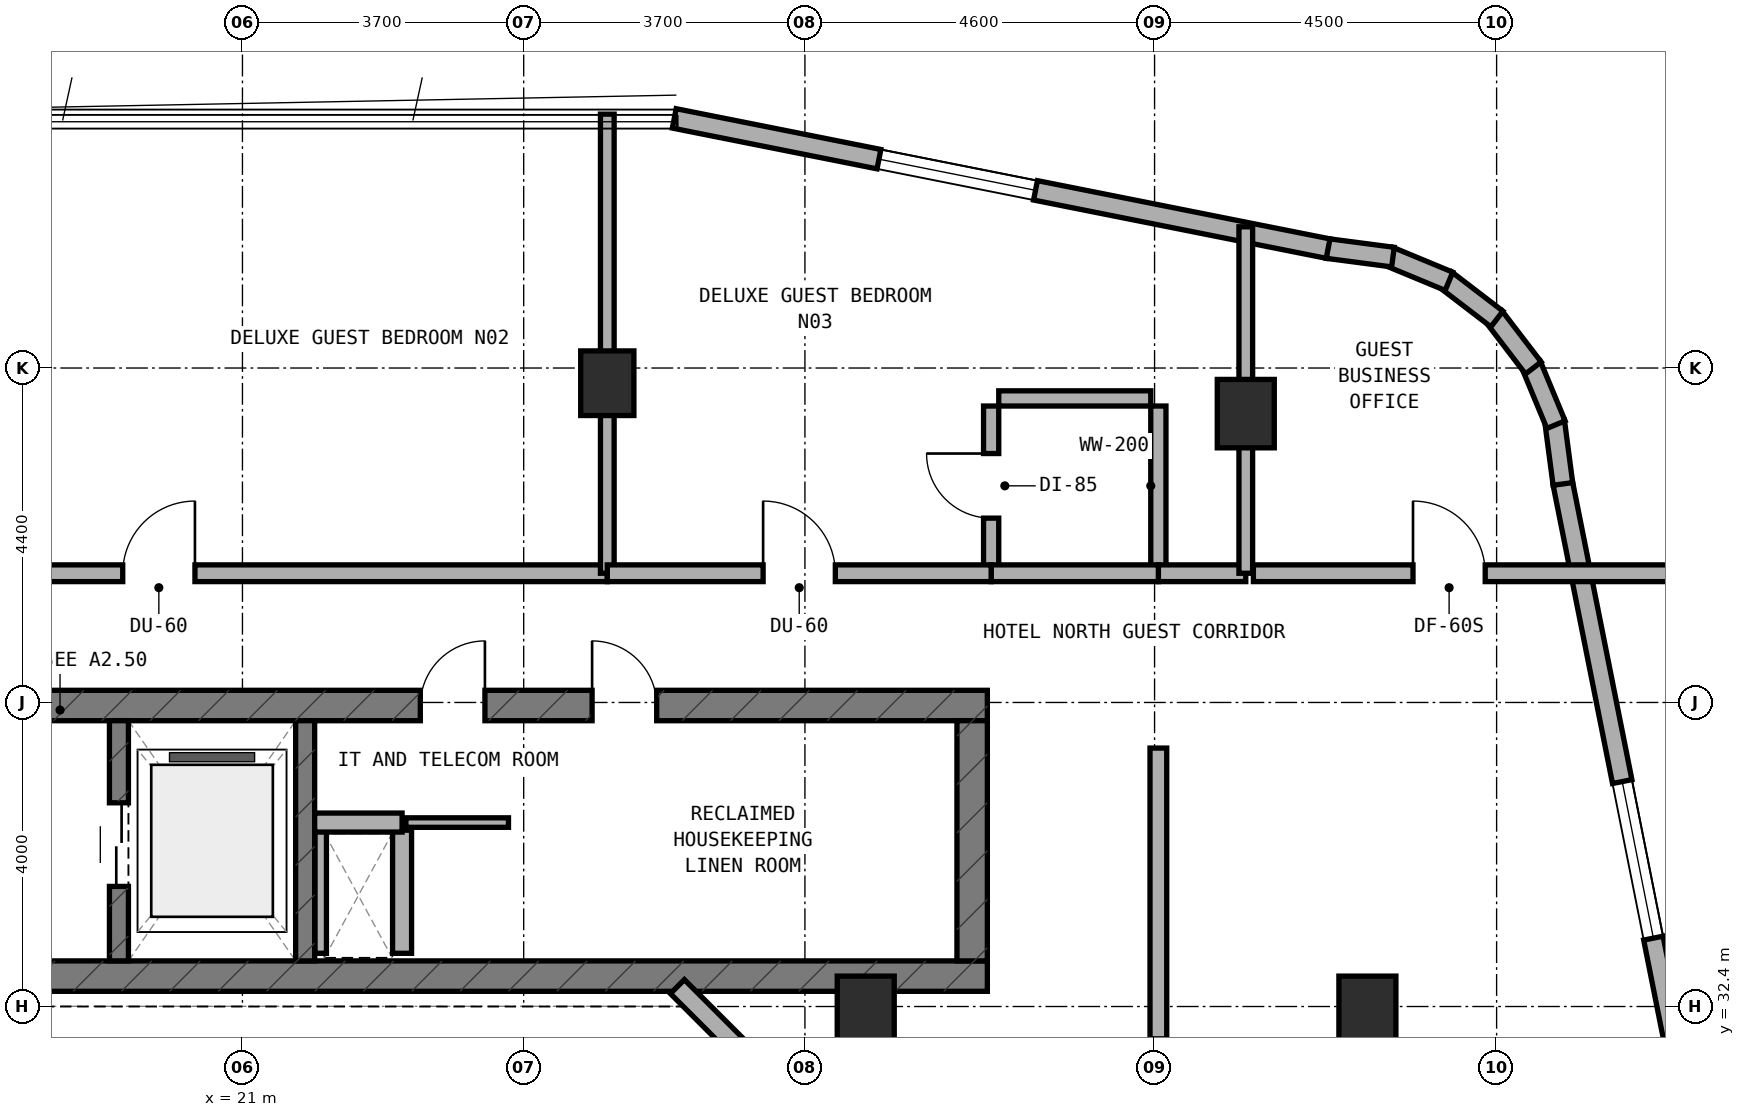
"""IFC4 building model, lengths in metres.
Left out: names, types, materials, properties, quantities, classifications, styles, units other than length and angle.
Written with IfcOpenShell. Run it as: python <this file> out.ifc"""

import sys

from ifc_helpers import new_model, si_unit, direction, frame, frame_2d, origin, origin_2d, place, context, subcontext, project, spatial, rectangle, extrude, element, fill, save


model = new_model("IFC4")
c1 = context("Model", 3, precision=1e-05, world=origin(), true_north=direction((0.0, 1.0)))
c2 = subcontext(c1, "Body", "Model", "MODEL_VIEW")
j1 = project(units=[si_unit("LENGTHUNIT", "METRE"), si_unit("PLANEANGLEUNIT", "RADIAN")], contexts=[c1])
p1 = place(None, origin())
s1 = spatial("IfcSite", under=j1, at=p1, CompositionType="ELEMENT")
p2 = place(p1, origin())
s2 = spatial("IfcBuilding", under=s1, at=p2, CompositionType="ELEMENT")
p3 = place(p2, frame((0.0, 0.0, 235.1)))
s3 = spatial("IfcBuildingStorey", under=s2, at=p3, CompositionType="ELEMENT", Elevation=235.1)
p4 = place(p3, frame((6.4, 32.8, 0.0), z_axis=(0.0, 0.0, 1.0), x_axis=(1.0, 0.0, 0.0)))
e1 = element("IfcWall", 1, at=p4, inside=s3, PredefinedType="SHEAR", context=c2, shape_type="SweptSolid", body=[
    extrude(rectangle(XDim=24.4, YDim=0.4, at=frame_2d((12.2, 0.0))), origin(), (0.0, 0.0, 1.0), 3.6),
])
p5 = place(p4, frame((6.05, 0.0, 0.0)))
e2 = element("IfcOpeningElement", 2, at=p5, cuts=e1, PredefinedType="OPENING", context=c2, shape_type="SweptSolid", body=[
    extrude(rectangle(XDim=1.1, YDim=2.15, at=frame_2d((0.55, 1.075))), frame((0.0, 0.21, 0.0), z_axis=(0.0, -1.0, 0.0), x_axis=(1.0, 0.0, 0.0)), (0.0, 0.0, 1.0), 0.42),
])
p6 = place(p3, frame((6.4, 36.36, 0.0), z_axis=(0.0, 0.0, 1.0), x_axis=(1.0, 0.0, 0.0)))
e3 = element("IfcWall", 3, at=p6, inside=s3, PredefinedType="SHEAR", context=c2, shape_type="SweptSolid", body=[
    extrude(rectangle(XDim=24.4, YDim=0.4, at=frame_2d((12.2, 0.0))), origin(), (0.0, 0.0, 1.0), 3.6),
])
p7 = place(p6, frame((9.15, 0.0, 0.0)))
e4 = element("IfcOpeningElement", 4, at=p7, cuts=e3, PredefinedType="OPENING", context=c2, shape_type="SweptSolid", body=[
    extrude(rectangle(XDim=1.2, YDim=2.15, at=frame_2d((0.6, 1.075))), frame((0.0, 0.21, 0.0), z_axis=(0.0, -1.0, 0.0), x_axis=(1.0, 0.0, 0.0)), (0.0, 0.0, 1.0), 0.42),
])
p8 = place(p6, frame((19.2, 0.0, 0.0)))
e5 = element("IfcOpeningElement", 5, at=p8, cuts=e3, PredefinedType="OPENING", context=c2, shape_type="SweptSolid", body=[
    extrude(rectangle(XDim=0.85, YDim=2.1, at=frame_2d((0.425, 1.05))), frame((0.0, 0.21, 0.0), z_axis=(0.0, -1.0, 0.0), x_axis=(1.0, 0.0, 0.0)), (0.0, 0.0, 1.0), 0.42),
])
p9 = place(p6, frame((16.94, 0.0, 0.0)))
e6 = element("IfcOpeningElement", 6, at=p9, cuts=e3, PredefinedType="OPENING", context=c2, shape_type="SweptSolid", body=[
    extrude(rectangle(XDim=0.85, YDim=2.1, at=frame_2d((0.425, 1.05))), frame((0.0, 0.21, 0.0), z_axis=(0.0, -1.0, 0.0), x_axis=(1.0, 0.0, 0.0)), (0.0, 0.0, 1.0), 0.42),
])
p10 = place(p3, frame((30.6, 33.0, 0.0), z_axis=(0.0, 0.0, 1.0), x_axis=(0.0, 1.0, 0.0)))
e7 = element("IfcWall", 7, at=p10, inside=s3, PredefinedType="SHEAR", context=c2, shape_type="SweptSolid", body=[
    extrude(rectangle(XDim=3.16, YDim=0.4, at=frame_2d((1.58, 0.0))), origin(), (0.0, 0.0, 1.0), 3.6),
])
p11 = place(p3, frame((19.375, 33.0, 0.0), z_axis=(0.0, 0.0, 1.0), x_axis=(0.0, 1.0, 0.0)))
e8 = element("IfcWall", 8, at=p11, inside=s3, PredefinedType="STANDARD", context=c2, shape_type="SweptSolid", body=[
    extrude(rectangle(XDim=3.16, YDim=0.25, at=frame_2d((1.58, 0.0))), origin(), (0.0, 0.0, 1.0), 3.28),
])
p12 = place(p11, frame((0.98, 0.0, 0.0)))
e9 = element("IfcOpeningElement", 9, at=p12, cuts=e8, PredefinedType="OPENING", context=c2, shape_type="SweptSolid", body=[
    extrude(rectangle(XDim=1.1, YDim=2.15, at=frame_2d((0.55, 1.075))), frame((0.0, 0.135, 0.0), z_axis=(0.0, -1.0, 0.0), x_axis=(1.0, 0.0, 0.0)), (0.0, 0.0, 1.0), 0.27),
])
p13 = place(p3, frame((21.825, 33.0, 0.0), z_axis=(0.0, 0.0, 1.0), x_axis=(0.0, 1.0, 0.0)))
e10 = element("IfcWall", 10, at=p13, inside=s3, PredefinedType="STANDARD", context=c2, shape_type="SweptSolid", body=[
    extrude(rectangle(XDim=3.16, YDim=0.25, at=frame_2d((1.58, 0.0))), origin(), (0.0, 0.0, 1.0), 3.28),
])
p14 = place(p3, frame((25.8, 40.6, 0.0), z_axis=(0.0, 0.0, 1.0), x_axis=(1.0, 0.0, 0.0)))
e11 = element("IfcColumn", 11, at=p14, inside=s3, PredefinedType="COLUMN", context=c2, shape_type="SweptSolid", body=[
    extrude(rectangle(XDim=0.7, YDim=0.85, at=origin_2d()), origin(), (0.0, 0.0, 1.0), 3.6),
])
for number, where, z_axis, x_axis in (
    (12, (34.2, 40.2, 0.0), (0.0, 0.0, 1.0), (1.0, 0.0, 0.0)),
    (13, (35.8, 32.35, 0.0), (0.0, 0.0, 1.0), (1.0, 0.0, 0.0)),
    (14, (29.2, 32.35, 0.0), (0.0, 0.0, 1.0), (1.0, 0.0, 0.0)),
):
    element("IfcColumn", number, at=place(p3, frame(where, z_axis=z_axis, x_axis=x_axis)), inside=s3, PredefinedType="COLUMN", context=c2, shape_type="SweptSolid", body=[
        extrude(rectangle(XDim=0.75, YDim=0.9, at=origin_2d()), origin(), (0.0, 0.0, 1.0), 3.6),
    ])
p15 = place(p3, frame((40.084, 30.681, 0.0), z_axis=(0.0, 0.0, 1.0), x_axis=(-0.195291715883, 0.980745199176, 0.0)))
e15 = element("IfcWall", 15, at=p15, inside=s3, PredefinedType="STANDARD", context=c2, shape_type="SweptSolid", body=[
    extrude(rectangle(XDim=8.771, YDim=0.26, at=frame_2d((4.385, 0.0))), origin(), (0.0, 0.0, 1.0), 3.28),
])
p16 = place(p15, frame((2.67, 0.0, 0.85)))
e16 = element("IfcOpeningElement", 16, at=p16, cuts=e15, PredefinedType="OPENING", context=c2, shape_type="SweptSolid", body=[
    extrude(rectangle(XDim=2.1, YDim=1.5, at=frame_2d((1.05, 0.75))), frame((0.0, 0.14, 0.0), z_axis=(0.0, -1.0, 0.0), x_axis=(1.0, 0.0, 0.0)), (0.0, 0.0, 1.0), 0.28),
])
p17 = place(p3, frame((38.372, 39.275, 0.0), z_axis=(0.0, 0.0, 1.0), x_axis=(-0.130954667764, 0.9913883573, 0.0)))
e17 = element("IfcWall", 17, at=p17, inside=s3, PredefinedType="STANDARD", context=c2, shape_type="SweptSolid", body=[
    extrude(rectangle(XDim=0.833, YDim=0.26, at=frame_2d((0.417, 0.0))), origin(), (0.0, 0.0, 1.0), 3.28),
])
p18 = place(p3, frame((38.281, 40.055, 0.0), z_axis=(0.0, 0.0, 1.0), x_axis=(-0.382985169477, 0.923754491172, 0.0)))
e18 = element("IfcWall", 18, at=p18, inside=s3, PredefinedType="STANDARD", context=c2, shape_type="SweptSolid", body=[
    extrude(rectangle(XDim=0.851, YDim=0.26, at=frame_2d((0.426, 0.0))), origin(), (0.0, 0.0, 1.0), 3.28),
])
for number, where, z_axis, x_axis in (
    (19, (37.983, 40.801, 0.0), (0.0, 0.0, 1.0), (-0.608, 0.794, 0.0)),
    (20, (37.504, 41.445, 0.0), (0.0, 0.0, 1.0), (-0.794, 0.608, 0.0)),
):
    element("IfcWall", number, at=place(p3, frame(where, z_axis=z_axis, x_axis=x_axis)), inside=s3, PredefinedType="STANDARD", context=c2, shape_type="SweptSolid", body=[
        extrude(rectangle(XDim=0.85, YDim=0.26, at=frame_2d((0.425, 0.0))), origin(), (0.0, 0.0, 1.0), 3.28),
    ])
p19 = place(p3, frame((36.873, 41.941, 0.0), z_axis=(0.0, 0.0, 1.0), x_axis=(-0.923652976167, 0.383229930484, 0.0)))
e21 = element("IfcWall", 21, at=p19, inside=s3, PredefinedType="STANDARD", context=c2, shape_type="SweptSolid", body=[
    extrude(rectangle(XDim=0.851, YDim=0.26, at=frame_2d((0.426, 0.0))), origin(), (0.0, 0.0, 1.0), 3.28),
])
p20 = place(p3, frame((36.136, 42.259, 0.0), z_axis=(0.0, 0.0, 1.0), x_axis=(-0.991493480548, 0.130156359936, 0.0)))
e22 = element("IfcWall", 22, at=p20, inside=s3, PredefinedType="STANDARD", context=c2, shape_type="SweptSolid", body=[
    extrude(rectangle(XDim=0.868, YDim=0.26, at=frame_2d((0.434, 0.0))), origin(), (0.0, 0.0, 1.0), 3.28),
])
p21 = place(p3, frame((35.283, 42.371, 0.0), z_axis=(0.0, 0.0, 1.0), x_axis=(-0.980745199176, 0.195291715883, 0.0)))
e23 = element("IfcWall", 23, at=p21, inside=s3, PredefinedType="STANDARD", context=c2, shape_type="SweptSolid", body=[
    extrude(rectangle(XDim=8.771, YDim=0.26, at=frame_2d((4.385, 0.0))), origin(), (0.0, 0.0, 1.0), 3.28),
])
p22 = place(p21, frame((3.925, 0.0, 0.85)))
e24 = element("IfcOpeningElement", 24, at=p22, cuts=e23, PredefinedType="OPENING", context=c2, shape_type="SweptSolid", body=[
    extrude(rectangle(XDim=2.1, YDim=1.5, at=frame_2d((1.05, 0.75))), frame((0.0, 0.14, 0.0), z_axis=(0.0, -1.0, 0.0), x_axis=(1.0, 0.0, 0.0)), (0.0, 0.0, 1.0), 0.28),
])
p23 = place(p3, frame((28.556, 30.828, 0.0), z_axis=(0.0, 0.0, 1.0), x_axis=(-0.707059717605, 0.707153841636, 0.0)))
e25 = element("IfcWall", 25, at=p23, inside=s3, PredefinedType="STANDARD", context=c2, shape_type="SweptSolid", body=[
    extrude(rectangle(XDim=2.594, YDim=0.26, at=frame_2d((1.297, 0.0))), origin(), (0.0, 0.0, 1.0), 3.28),
])
p24 = place(p3, frame((22.03, 33.1, 0.0), z_axis=(0.0, 0.0, 1.0), x_axis=(0.0, 1.0, 0.0)))
e26 = element("IfcWall", 26, at=p24, inside=s3, PredefinedType="PARTITIONING", context=c2, shape_type="SweptSolid", body=[
    extrude(rectangle(XDim=1.62, YDim=0.15, at=frame_2d((0.81, 0.0))), origin(), (0.0, 0.0, 1.0), 3.28),
])
p25 = place(p3, frame((23.1, 33.1, 0.0), z_axis=(0.0, 0.0, 1.0), x_axis=(0.0, 1.0, 0.0)))
e27 = element("IfcWall", 27, at=p25, inside=s3, PredefinedType="SOLIDWALL", context=c2, shape_type="SweptSolid", body=[
    extrude(rectangle(XDim=1.62, YDim=0.25, at=frame_2d((0.81, 0.0))), origin(), (0.0, 0.0, 1.0), 3.28),
])
p26 = place(p3, frame((21.95, 34.82, 0.0), z_axis=(0.0, 0.0, 1.0), x_axis=(1.0, 0.0, 0.0)))
e28 = element("IfcWall", 28, at=p26, inside=s3, PredefinedType="SOLIDWALL", context=c2, shape_type="SweptSolid", body=[
    extrude(rectangle(XDim=1.15, YDim=0.25, at=frame_2d((0.575, 0.0))), origin(), (0.0, 0.0, 1.0), 3.28),
])
p27 = place(p3, frame((23.15, 34.82, 0.0), z_axis=(0.0, 0.0, 1.0), x_axis=(1.0, 0.0, 0.0)))
e29 = element("IfcWall", 29, at=p27, inside=s3, PredefinedType="PARTITIONING", context=c2, shape_type="SweptSolid", body=[
    extrude(rectangle(XDim=1.35, YDim=0.125, at=frame_2d((0.675, 0.0))), origin(), (0.0, 0.0, 1.0), 3.28),
])
p28 = place(p3, frame((14.0, 38.1, 0.0), z_axis=(0.0, 0.0, 1.0), x_axis=(1.0, 0.0, 0.0)))
e30 = element("IfcWall", 30, at=p28, inside=s3, PredefinedType="SOLIDWALL", context=c2, shape_type="SweptSolid", body=[
    extrude(rectangle(XDim=11.8, YDim=0.22, at=frame_2d((5.9, 0.0))), origin(), (0.0, 0.0, 1.0), 2.705),
])
p29 = place(p28, frame((5.425, 0.0, 0.0)))
e31 = element("IfcOpeningElement", 31, at=p29, cuts=e30, PredefinedType="OPENING", context=c2, shape_type="SweptSolid", body=[
    extrude(rectangle(XDim=0.95, YDim=2.1, at=frame_2d((0.475, 1.05))), frame((0.0, 0.12, 0.0), z_axis=(0.0, -1.0, 0.0), x_axis=(1.0, 0.0, 0.0)), (0.0, 0.0, 1.0), 0.24),
])
p30 = place(p3, frame((25.8, 38.1, 0.0), z_axis=(0.0, 0.0, 1.0), x_axis=(0.0, 1.0, 0.0)))
e32 = element("IfcWall", 32, at=p30, inside=s3, PredefinedType="SOLIDWALL", context=c2, shape_type="SweptSolid", body=[
    extrude(rectangle(XDim=6.04, YDim=0.18, at=frame_2d((3.02, 0.0))), origin(), (0.0, 0.0, 1.0), 2.705),
])
p31 = place(p3, frame((30.85, 38.2, 0.0), z_axis=(0.0, 0.0, 1.0), x_axis=(0.0, 1.0, 0.0)))
e33 = element("IfcWall", 33, at=p31, inside=s3, PredefinedType="PLUMBINGWALL", context=c2, shape_type="SweptSolid", body=[
    extrude(rectangle(XDim=2.1, YDim=0.2, at=frame_2d((1.05, 0.0))), origin(), (0.0, 0.0, 1.0), 2.895),
])
p32 = place(p31, frame((0.625, 0.0, 0.0)))
e34 = element("IfcOpeningElement", 34, at=p32, cuts=e33, PredefinedType="OPENING", context=c2, shape_type="SweptSolid", body=[
    extrude(rectangle(XDim=0.85, YDim=2.1, at=frame_2d((0.425, 1.05))), frame((0.0, 0.11, 0.0), z_axis=(0.0, -1.0, 0.0), x_axis=(1.0, 0.0, 0.0)), (0.0, 0.0, 1.0), 0.22),
])
p33 = place(p3, frame((30.95, 40.4, 0.0), z_axis=(0.0, 0.0, 1.0), x_axis=(1.0, 0.0, 0.0)))
e35 = element("IfcWall", 35, at=p33, inside=s3, PredefinedType="PLUMBINGWALL", context=c2, shape_type="SweptSolid", body=[
    extrude(rectangle(XDim=2.0, YDim=0.2, at=frame_2d((1.0, 0.0))), origin(), (0.0, 0.0, 1.0), 2.975),
])
p34 = place(p3, frame((33.05, 38.2, 0.0), z_axis=(0.0, 0.0, 1.0), x_axis=(0.0, 1.0, 0.0)))
e36 = element("IfcWall", 36, at=p34, inside=s3, PredefinedType="PLUMBINGWALL", context=c2, shape_type="SweptSolid", body=[
    extrude(rectangle(XDim=2.1, YDim=0.2, at=frame_2d((1.05, 0.0))), origin(), (0.0, 0.0, 1.0), 2.895),
])
p35 = place(p3, frame((33.05, 38.1, 0.0), z_axis=(0.0, 0.0, 1.0), x_axis=(1.0, 0.0, 0.0)))
e37 = element("IfcWall", 37, at=p35, inside=s3, PredefinedType="SOLIDWALL", context=c2, shape_type="SweptSolid", body=[
    extrude(rectangle(XDim=1.15, YDim=0.22, at=frame_2d((0.575, 0.0))), origin(), (0.0, 0.0, 1.0), 2.705),
])
p36 = place(p3, frame((30.85, 38.1, 0.0), z_axis=(0.0, 0.0, 1.0), x_axis=(1.0, 0.0, 0.0)))
e38 = element("IfcWall", 38, at=p36, inside=s3, PredefinedType="SOLIDWALL", context=c2, shape_type="SweptSolid", body=[
    extrude(rectangle(XDim=2.2, YDim=0.22, at=frame_2d((1.1, 0.0))), origin(), (0.0, 0.0, 1.0), 3.28),
])
p37 = place(p3, frame((25.8, 38.1, 0.0), z_axis=(0.0, 0.0, 1.0), x_axis=(1.0, 0.0, 0.0)))
e39 = element("IfcWall", 39, at=p37, inside=s3, PredefinedType="SOLIDWALL", context=c2, shape_type="SweptSolid", body=[
    extrude(rectangle(XDim=5.05, YDim=0.22, at=frame_2d((2.525, 0.0))), origin(), (0.0, 0.0, 1.0), 2.705),
])
p38 = place(p37, frame((2.05, 0.0, 0.0)))
e40 = element("IfcOpeningElement", 40, at=p38, cuts=e39, PredefinedType="OPENING", context=c2, shape_type="SweptSolid", body=[
    extrude(rectangle(XDim=0.95, YDim=2.1, at=frame_2d((0.475, 1.05))), frame((0.0, 0.12, 0.0), z_axis=(0.0, -1.0, 0.0), x_axis=(1.0, 0.0, 0.0)), (0.0, 0.0, 1.0), 0.24),
])
p39 = place(p3, frame((34.2, 38.1, 0.0), z_axis=(0.0, 0.0, 1.0), x_axis=(0.0, 1.0, 0.0)))
e41 = element("IfcWall", 41, at=p39, inside=s3, PredefinedType="SOLIDWALL", context=c2, shape_type="SweptSolid", body=[
    extrude(rectangle(XDim=4.558, YDim=0.18, at=frame_2d((2.279, 0.0))), origin(), (0.0, 0.0, 1.0), 2.705),
])
p40 = place(p3, frame((34.3, 38.1, 0.0), z_axis=(0.0, 0.0, 1.0), x_axis=(1.0, 0.0, 0.0)))
e42 = element("IfcWall", 42, at=p40, inside=s3, PredefinedType="SOLIDWALL", context=c2, shape_type="SweptSolid", body=[
    extrude(rectangle(XDim=5.64, YDim=0.22, at=frame_2d((2.82, 0.0))), origin(), (0.0, 0.0, 1.0), 2.975),
])
p41 = place(p40, frame((2.1, 0.0, 0.0)))
e43 = element("IfcOpeningElement", 43, at=p41, cuts=e42, PredefinedType="OPENING", context=c2, shape_type="SweptSolid", body=[
    extrude(rectangle(XDim=0.95, YDim=2.1, at=frame_2d((0.475, 1.05))), frame((0.0, 0.12, 0.0), z_axis=(0.0, -1.0, 0.0), x_axis=(1.0, 0.0, 0.0)), (0.0, 0.0, 1.0), 0.24),
])
p42 = place(p3, frame((33.05, 27.2, 0.0), z_axis=(0.0, 0.0, 1.0), x_axis=(0.0, 1.0, 0.0)))
e44 = element("IfcWall", 44, at=p42, inside=s3, PredefinedType="SOLIDWALL", context=c2, shape_type="SweptSolid", body=[
    extrude(rectangle(XDim=8.6, YDim=0.22, at=frame_2d((4.3, 0.0))), origin(), (0.0, 0.0, 1.0), 2.705),
])
p43 = place(p42, frame((3.825, 0.0, 0.0)))
e45 = element("IfcOpeningElement", 45, at=p43, cuts=e44, PredefinedType="OPENING", context=c2, shape_type="SweptSolid", body=[
    extrude(rectangle(XDim=0.95, YDim=2.1, at=frame_2d((0.475, 1.05))), frame((0.0, 0.12, 0.0), z_axis=(0.0, -1.0, 0.0), x_axis=(1.0, 0.0, 0.0)), (0.0, 0.0, 1.0), 0.24),
])
p44 = place(p16, origin())
e46 = element("IfcWindow", 46, at=p44, inside=s3, PartitioningType="SINGLE_PANEL", PredefinedType="WINDOW", context=c2, shape_type="SweptSolid", body=[
    extrude(rectangle(XDim=2.1, YDim=1.5, at=frame_2d((1.05, 0.75))), frame((0.0, 0.03, 0.0), z_axis=(0.0, -1.0, 0.0), x_axis=(1.0, 0.0, 0.0)), (0.0, 0.0, 1.0), 0.06),
])
fill(e16, e46)
p45 = place(p22, origin())
e47 = element("IfcWindow", 47, at=p45, inside=s3, PartitioningType="SINGLE_PANEL", PredefinedType="WINDOW", context=c2, shape_type="SweptSolid", body=[
    extrude(rectangle(XDim=2.1, YDim=1.5, at=frame_2d((1.05, 0.75))), frame((0.0, 0.03, 0.0), z_axis=(0.0, -1.0, 0.0), x_axis=(1.0, 0.0, 0.0)), (0.0, 0.0, 1.0), 0.06),
])
fill(e24, e47)
p46 = place(p12, origin())
e48 = element("IfcDoor", 48, at=p46, inside=s3, OperationType="DOUBLE_DOOR_SLIDING", PredefinedType="DOOR", context=c2, shape_type="SweptSolid", body=[
    extrude(rectangle(XDim=1.1, YDim=2.15, at=frame_2d((0.55, 1.075))), frame((0.0, 0.025, 0.0), z_axis=(0.0, -1.0, 0.0), x_axis=(1.0, 0.0, 0.0)), (0.0, 0.0, 1.0), 0.05),
])
fill(e9, e48)
p47 = place(p8, origin())
e49 = element("IfcDoor", 49, at=p47, inside=s3, OperationType="SINGLE_SWING_LEFT", PredefinedType="DOOR", context=c2, shape_type="SweptSolid", body=[
    extrude(rectangle(XDim=0.85, YDim=2.1, at=frame_2d((0.425, 1.05))), frame((0.0, 0.025, 0.0), z_axis=(0.0, -1.0, 0.0), x_axis=(1.0, 0.0, 0.0)), (0.0, 0.0, 1.0), 0.05),
])
fill(e5, e49)
p48 = place(p9, origin())
e50 = element("IfcDoor", 50, at=p48, inside=s3, OperationType="SINGLE_SWING_RIGHT", PredefinedType="DOOR", context=c2, shape_type="SweptSolid", body=[
    extrude(rectangle(XDim=0.85, YDim=2.1, at=frame_2d((0.425, 1.05))), frame((0.0, 0.025, 0.0), z_axis=(0.0, -1.0, 0.0), x_axis=(1.0, 0.0, 0.0)), (0.0, 0.0, 1.0), 0.05),
])
fill(e6, e50)
p49 = place(p29, origin())
e51 = element("IfcDoor", 51, at=p49, inside=s3, OperationType="SINGLE_SWING_RIGHT", PredefinedType="DOOR", context=c2, shape_type="SweptSolid", body=[
    extrude(rectangle(XDim=0.95, YDim=2.1, at=frame_2d((0.475, 1.05))), frame((0.0, 0.025, 0.0), z_axis=(0.0, -1.0, 0.0), x_axis=(1.0, 0.0, 0.0)), (0.0, 0.0, 1.0), 0.05),
])
fill(e31, e51)
p50 = place(p32, origin())
e52 = element("IfcDoor", 52, at=p50, inside=s3, OperationType="SINGLE_SWING_RIGHT", PredefinedType="DOOR", context=c2, shape_type="SweptSolid", body=[
    extrude(rectangle(XDim=0.85, YDim=2.1, at=frame_2d((0.425, 1.05))), frame((0.0, 0.025, 0.0), z_axis=(0.0, -1.0, 0.0), x_axis=(1.0, 0.0, 0.0)), (0.0, 0.0, 1.0), 0.05),
])
fill(e34, e52)
p51 = place(p38, origin())
e53 = element("IfcDoor", 53, at=p51, inside=s3, OperationType="SINGLE_SWING_LEFT", PredefinedType="DOOR", context=c2, shape_type="SweptSolid", body=[
    extrude(rectangle(XDim=0.95, YDim=2.1, at=frame_2d((0.475, 1.05))), frame((0.0, 0.025, 0.0), z_axis=(0.0, -1.0, 0.0), x_axis=(1.0, 0.0, 0.0)), (0.0, 0.0, 1.0), 0.05),
])
fill(e40, e53)
p52 = place(p41, origin())
e54 = element("IfcDoor", 54, at=p52, inside=s3, OperationType="SINGLE_SWING_LEFT", PredefinedType="DOOR", context=c2, shape_type="SweptSolid", body=[
    extrude(rectangle(XDim=0.95, YDim=2.1, at=frame_2d((0.475, 1.05))), frame((0.0, 0.025, 0.0), z_axis=(0.0, -1.0, 0.0), x_axis=(1.0, 0.0, 0.0)), (0.0, 0.0, 1.0), 0.05),
])
fill(e43, e54)
save(model, sys.argv[1])
